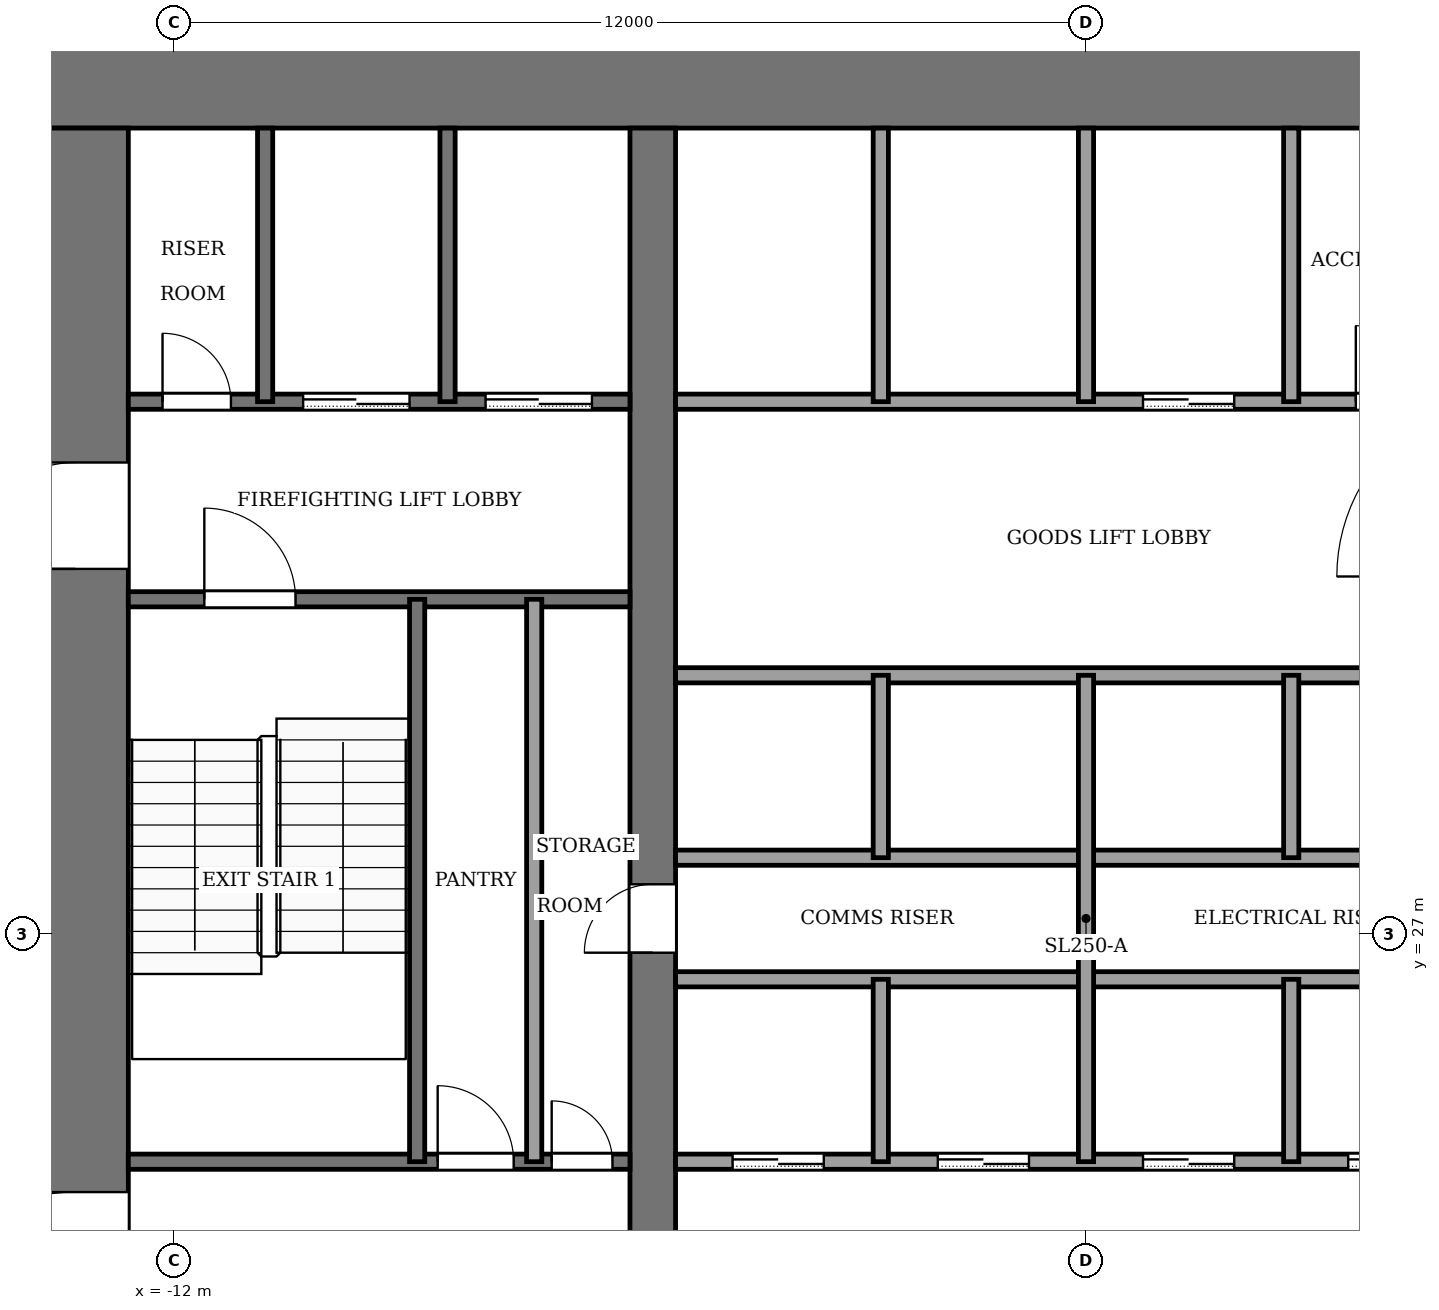
"""IFC4 building model, lengths in metres.
Left out: names, types, materials, properties, quantities, classifications, styles, units other than length and angle.
Written with IfcOpenShell. Run it as: python <this file> out.ifc"""

import sys

from ifc_helpers import new_model, si_unit, direction, frame, frame_2d, origin, place, context, subcontext, project, spatial, rectangle, extrude, element, fill, save


model = new_model("IFC4")
c1 = context("Model", 3, precision=1e-05, world=origin(), true_north=direction((0.0, 1.0)))
c2 = subcontext(c1, "Body", "Model", "MODEL_VIEW")
j1 = project(units=[si_unit("LENGTHUNIT", "METRE"), si_unit("PLANEANGLEUNIT", "RADIAN")], contexts=[c1])
p1 = place(None, origin())
s1 = spatial("IfcSite", under=j1, at=p1, CompositionType="ELEMENT")
p2 = place(p1, origin())
s2 = spatial("IfcBuilding", under=s1, at=p2, CompositionType="ELEMENT")
p3 = place(p2, frame((0.0, 0.0, 38.0)))
s3 = spatial("IfcBuildingStorey", under=s2, at=p3, CompositionType="ELEMENT", Elevation=38.0)
p4 = place(p3, frame((-14.0, 38.3, -0.13), z_axis=(0.0, 0.0, 1.0), x_axis=(1.0, 0.0, 0.0)))
e1 = element("IfcWall", 1, at=p4, inside=s3, PredefinedType="SHEAR", context=c2, shape_type="SweptSolid", body=[
    extrude(rectangle(XDim=28.0, YDim=1.4, at=frame_2d((14.0, 0.0))), origin(), (0.0, 0.0, 1.0), 4.0),
])
p5 = place(p3, frame((-13.3, 18.4, -0.13), z_axis=(0.0, 0.0, 1.0), x_axis=(0.0, 1.0, 0.0)))
e2 = element("IfcWall", 2, at=p5, inside=s3, PredefinedType="SHEAR", context=c2, shape_type="SweptSolid", body=[
    extrude(rectangle(XDim=19.2, YDim=1.4, at=frame_2d((9.6, 0.0))), origin(), (0.0, 0.0, 1.0), 4.0),
])
p6 = place(p5, frame((2.8, 0.0, 0.13)))
e3 = element("IfcOpeningElement", 3, at=p6, cuts=e2, PredefinedType="OPENING", context=c2, shape_type="SweptSolid", body=[
    extrude(rectangle(XDim=2.4, YDim=2.4, at=frame_2d((1.2, 1.2))), frame((0.0, 0.71, 0.0), z_axis=(0.0, -1.0, 0.0), x_axis=(1.0, 0.0, 0.0)), (0.0, 0.0, 1.0), 1.42),
])
p7 = place(p5, frame((13.4, 0.0, 0.13)))
e4 = element("IfcOpeningElement", 4, at=p7, cuts=e2, PredefinedType="OPENING", context=c2, shape_type="SweptSolid", body=[
    extrude(rectangle(XDim=1.4, YDim=2.2, at=frame_2d((0.7, 1.1))), frame((0.0, 0.71, 0.0), z_axis=(0.0, -1.0, 0.0), x_axis=(1.0, 0.0, 0.0)), (0.0, 0.0, 1.0), 1.42),
])
p8 = place(p3, frame((-5.7, 18.4, -0.13), z_axis=(0.0, 0.0, 1.0), x_axis=(0.0, 1.0, 0.0)))
e5 = element("IfcWall", 5, at=p8, inside=s3, PredefinedType="SHEAR", context=c2, shape_type="SweptSolid", body=[
    extrude(rectangle(XDim=19.2, YDim=0.6, at=frame_2d((9.6, 0.0))), origin(), (0.0, 0.0, 1.0), 4.0),
])
p9 = place(p8, frame((8.35, 0.0, 0.13)))
e6 = element("IfcOpeningElement", 6, at=p9, cuts=e5, PredefinedType="OPENING", context=c2, shape_type="SweptSolid", body=[
    extrude(rectangle(XDim=0.9, YDim=2.1, at=frame_2d((0.45, 1.05))), frame((0.0, 0.31, 0.0), z_axis=(0.0, -1.0, 0.0), x_axis=(1.0, 0.0, 0.0)), (0.0, 0.0, 1.0), 0.62),
])
p10 = place(p3, frame((-12.6, 24.0, 0.0), z_axis=(0.0, 0.0, 1.0), x_axis=(1.0, 0.0, 0.0)))
e7 = element("IfcWall", 7, at=p10, inside=s3, PredefinedType="PARTITIONING", context=c2, shape_type="SweptSolid", body=[
    extrude(rectangle(XDim=6.6, YDim=0.2, at=frame_2d((3.3, 0.0))), origin(), (0.0, 0.0, 1.0), 3.87),
])
p11 = place(p10, frame((4.07, 0.0, 0.0)))
e8 = element("IfcOpeningElement", 8, at=p11, cuts=e7, PredefinedType="OPENING", context=c2, shape_type="SweptSolid", body=[
    extrude(rectangle(XDim=1.0, YDim=2.1, at=frame_2d((0.5, 1.05))), frame((0.0, 0.11, 0.0), z_axis=(0.0, -1.0, 0.0), x_axis=(1.0, 0.0, 0.0)), (0.0, 0.0, 1.0), 0.22),
])
p12 = place(p10, frame((5.57, 0.0, 0.0)))
e9 = element("IfcOpeningElement", 9, at=p12, cuts=e7, PredefinedType="OPENING", context=c2, shape_type="SweptSolid", body=[
    extrude(rectangle(XDim=0.8, YDim=2.1, at=frame_2d((0.4, 1.05))), frame((0.0, 0.11, 0.0), z_axis=(0.0, -1.0, 0.0), x_axis=(1.0, 0.0, 0.0)), (0.0, 0.0, 1.0), 0.22),
])
p13 = place(p3, frame((-5.4, 24.0, 0.0), z_axis=(0.0, 0.0, 1.0), x_axis=(1.0, 0.0, 0.0)))
e10 = element("IfcWall", 10, at=p13, inside=s3, PredefinedType="PARTITIONING", context=c2, shape_type="SweptSolid", body=[
    extrude(rectangle(XDim=10.8, YDim=0.2, at=frame_2d((5.4, 0.0))), origin(), (0.0, 0.0, 1.0), 3.87),
])
p14 = place(p13, frame((0.75, 0.0, 0.0)))
e11 = element("IfcOpeningElement", 11, at=p14, cuts=e10, PredefinedType="OPENING", context=c2, shape_type="SweptSolid", body=[
    extrude(rectangle(XDim=1.2, YDim=2.2, at=frame_2d((0.6, 1.1))), frame((0.0, 0.11, 0.0), z_axis=(0.0, -1.0, 0.0), x_axis=(1.0, 0.0, 0.0)), (0.0, 0.0, 1.0), 0.22),
])
p15 = place(p13, frame((3.45, 0.0, 0.0)))
e12 = element("IfcOpeningElement", 12, at=p15, cuts=e10, PredefinedType="OPENING", context=c2, shape_type="SweptSolid", body=[
    extrude(rectangle(XDim=1.2, YDim=2.2, at=frame_2d((0.6, 1.1))), frame((0.0, 0.11, 0.0), z_axis=(0.0, -1.0, 0.0), x_axis=(1.0, 0.0, 0.0)), (0.0, 0.0, 1.0), 0.22),
])
p16 = place(p13, frame((6.15, 0.0, 0.0)))
e13 = element("IfcOpeningElement", 13, at=p16, cuts=e10, PredefinedType="OPENING", context=c2, shape_type="SweptSolid", body=[
    extrude(rectangle(XDim=1.2, YDim=2.2, at=frame_2d((0.6, 1.1))), frame((0.0, 0.11, 0.0), z_axis=(0.0, -1.0, 0.0), x_axis=(1.0, 0.0, 0.0)), (0.0, 0.0, 1.0), 0.22),
])
p17 = place(p13, frame((8.85, 0.0, 0.0)))
e14 = element("IfcOpeningElement", 14, at=p17, cuts=e10, PredefinedType="OPENING", context=c2, shape_type="SweptSolid", body=[
    extrude(rectangle(XDim=1.2, YDim=2.2, at=frame_2d((0.6, 1.1))), frame((0.0, 0.11, 0.0), z_axis=(0.0, -1.0, 0.0), x_axis=(1.0, 0.0, 0.0)), (0.0, 0.0, 1.0), 0.22),
])
for number, where, z_axis, x_axis in (
    (15, (-5.4, 26.4, 0.0), (0.0, 0.0, 1.0), (1.0, 0.0, 0.0)),
    (16, (-5.4, 28.0, 0.0), (0.0, 0.0, 1.0), (1.0, 0.0, 0.0)),
    (17, (-5.4, 30.4, 0.0), (0.0, 0.0, 1.0), (1.0, 0.0, 0.0)),
):
    element("IfcWall", number, at=place(p3, frame(where, z_axis=z_axis, x_axis=x_axis)), inside=s3, PredefinedType="PARTITIONING", context=c2, shape_type="SweptSolid", body=[
        extrude(rectangle(XDim=10.8, YDim=0.2, at=frame_2d((5.4, 0.0))), origin(), (0.0, 0.0, 1.0), 3.87),
    ])
p18 = place(p3, frame((-12.6, 31.4, 0.0), z_axis=(0.0, 0.0, 1.0), x_axis=(1.0, 0.0, 0.0)))
e18 = element("IfcWall", 18, at=p18, inside=s3, PredefinedType="PARTITIONING", context=c2, shape_type="SweptSolid", body=[
    extrude(rectangle(XDim=6.6, YDim=0.2, at=frame_2d((3.3, 0.0))), origin(), (0.0, 0.0, 1.0), 3.87),
])
p19 = place(p18, frame((1.0, 0.0, 0.0)))
e19 = element("IfcOpeningElement", 19, at=p19, cuts=e18, PredefinedType="OPENING", context=c2, shape_type="SweptSolid", body=[
    extrude(rectangle(XDim=1.2, YDim=2.2, at=frame_2d((0.6, 1.1))), frame((0.0, 0.11, 0.0), z_axis=(0.0, -1.0, 0.0), x_axis=(1.0, 0.0, 0.0)), (0.0, 0.0, 1.0), 0.22),
])
p20 = place(p3, frame((-12.6, 34.0, 0.0), z_axis=(0.0, 0.0, 1.0), x_axis=(1.0, 0.0, 0.0)))
e20 = element("IfcWall", 20, at=p20, inside=s3, PredefinedType="PARTITIONING", context=c2, shape_type="SweptSolid", body=[
    extrude(rectangle(XDim=6.6, YDim=0.2, at=frame_2d((3.3, 0.0))), origin(), (0.0, 0.0, 1.0), 3.87),
])
p21 = place(p20, frame((4.7, 0.0, 0.0)))
e21 = element("IfcOpeningElement", 21, at=p21, cuts=e20, PredefinedType="OPENING", context=c2, shape_type="SweptSolid", body=[
    extrude(rectangle(XDim=1.4, YDim=2.2, at=frame_2d((0.7, 1.1))), frame((0.0, 0.11, 0.0), z_axis=(0.0, -1.0, 0.0), x_axis=(1.0, 0.0, 0.0)), (0.0, 0.0, 1.0), 0.22),
])
p22 = place(p20, frame((2.3, 0.0, 0.0)))
e22 = element("IfcOpeningElement", 22, at=p22, cuts=e20, PredefinedType="OPENING", context=c2, shape_type="SweptSolid", body=[
    extrude(rectangle(XDim=1.4, YDim=2.2, at=frame_2d((0.7, 1.1))), frame((0.0, 0.11, 0.0), z_axis=(0.0, -1.0, 0.0), x_axis=(1.0, 0.0, 0.0)), (0.0, 0.0, 1.0), 0.22),
])
p23 = place(p20, frame((0.45, 0.0, 0.0)))
e23 = element("IfcOpeningElement", 23, at=p23, cuts=e20, PredefinedType="OPENING", context=c2, shape_type="SweptSolid", body=[
    extrude(rectangle(XDim=0.9, YDim=2.1, at=frame_2d((0.45, 1.05))), frame((0.0, 0.11, 0.0), z_axis=(0.0, -1.0, 0.0), x_axis=(1.0, 0.0, 0.0)), (0.0, 0.0, 1.0), 0.22),
])
p24 = place(p3, frame((-5.4, 34.0, 0.0), z_axis=(0.0, 0.0, 1.0), x_axis=(1.0, 0.0, 0.0)))
e24 = element("IfcWall", 24, at=p24, inside=s3, PredefinedType="PARTITIONING", context=c2, shape_type="SweptSolid", body=[
    extrude(rectangle(XDim=10.8, YDim=0.2, at=frame_2d((5.4, 0.0))), origin(), (0.0, 0.0, 1.0), 3.87),
])
p25 = place(p24, frame((6.15, 0.0, 0.0)))
e25 = element("IfcOpeningElement", 25, at=p25, cuts=e24, PredefinedType="OPENING", context=c2, shape_type="SweptSolid", body=[
    extrude(rectangle(XDim=1.2, YDim=2.2, at=frame_2d((0.6, 1.1))), frame((0.0, 0.11, 0.0), z_axis=(0.0, -1.0, 0.0), x_axis=(1.0, 0.0, 0.0)), (0.0, 0.0, 1.0), 0.22),
])
p26 = place(p24, frame((8.95, 0.0, 0.0)))
e26 = element("IfcOpeningElement", 26, at=p26, cuts=e24, PredefinedType="OPENING", context=c2, shape_type="SweptSolid", body=[
    extrude(rectangle(XDim=1.0, YDim=2.1, at=frame_2d((0.5, 1.05))), frame((0.0, 0.11, 0.0), z_axis=(0.0, -1.0, 0.0), x_axis=(1.0, 0.0, 0.0)), (0.0, 0.0, 1.0), 0.22),
])
p27 = place(p3, frame((-10.8, 34.0, 0.0), z_axis=(0.0, 0.0, 1.0), x_axis=(0.0, 1.0, 0.0)))
e27 = element("IfcWall", 27, at=p27, inside=s3, PredefinedType="PARTITIONING", context=c2, shape_type="SweptSolid", body=[
    extrude(rectangle(XDim=3.6, YDim=0.2, at=frame_2d((1.8, 0.0))), origin(), (0.0, 0.0, 1.0), 3.87),
])
p28 = place(p3, frame((-8.8, 24.0, 0.0), z_axis=(0.0, 0.0, 1.0), x_axis=(0.0, 1.0, 0.0)))
e28 = element("IfcWall", 28, at=p28, inside=s3, PredefinedType="PARTITIONING", context=c2, shape_type="SweptSolid", body=[
    extrude(rectangle(XDim=7.4, YDim=0.2, at=frame_2d((3.7, 0.0))), origin(), (0.0, 0.0, 1.0), 3.87),
])
p29 = place(p3, frame((-8.4, 34.0, 0.0), z_axis=(0.0, 0.0, 1.0), x_axis=(0.0, 1.0, 0.0)))
e29 = element("IfcWall", 29, at=p29, inside=s3, PredefinedType="PARTITIONING", context=c2, shape_type="SweptSolid", body=[
    extrude(rectangle(XDim=3.6, YDim=0.2, at=frame_2d((1.8, 0.0))), origin(), (0.0, 0.0, 1.0), 3.87),
])
p30 = place(p3, frame((-7.26, 24.0, 0.0), z_axis=(0.0, 0.0, 1.0), x_axis=(0.0, 1.0, 0.0)))
e30 = element("IfcWall", 30, at=p30, inside=s3, PredefinedType="PARTITIONING", context=c2, shape_type="SweptSolid", body=[
    extrude(rectangle(XDim=7.4, YDim=0.2, at=frame_2d((3.7, 0.0))), origin(), (0.0, 0.0, 1.0), 3.87),
])
for number, where, z_axis, x_axis in (
    (31, (-2.7, 24.0, 0.0), (0.0, 0.0, 1.0), (0.0, 1.0, 0.0)),
    (32, (-2.7, 28.0, 0.0), (0.0, 0.0, 1.0), (0.0, 1.0, 0.0)),
):
    element("IfcWall", number, at=place(p3, frame(where, z_axis=z_axis, x_axis=x_axis)), inside=s3, PredefinedType="PARTITIONING", context=c2, shape_type="SweptSolid", body=[
        extrude(rectangle(XDim=2.4, YDim=0.2, at=frame_2d((1.2, 0.0))), origin(), (0.0, 0.0, 1.0), 3.87),
    ])
p31 = place(p3, frame((-2.7, 34.0, 0.0), z_axis=(0.0, 0.0, 1.0), x_axis=(0.0, 1.0, 0.0)))
e33 = element("IfcWall", 33, at=p31, inside=s3, PredefinedType="PARTITIONING", context=c2, shape_type="SweptSolid", body=[
    extrude(rectangle(XDim=3.6, YDim=0.2, at=frame_2d((1.8, 0.0))), origin(), (0.0, 0.0, 1.0), 3.87),
])
p32 = place(p3, frame((0.0, 24.0, 0.0), z_axis=(0.0, 0.0, 1.0), x_axis=(0.0, 1.0, 0.0)))
e34 = element("IfcWall", 34, at=p32, inside=s3, PredefinedType="PARTITIONING", context=c2, shape_type="SweptSolid", body=[
    extrude(rectangle(XDim=6.4, YDim=0.2, at=frame_2d((3.2, 0.0))), origin(), (0.0, 0.0, 1.0), 3.87),
])
p33 = place(p3, frame((0.0, 34.0, 0.0), z_axis=(0.0, 0.0, 1.0), x_axis=(0.0, 1.0, 0.0)))
e35 = element("IfcWall", 35, at=p33, inside=s3, PredefinedType="PARTITIONING", context=c2, shape_type="SweptSolid", body=[
    extrude(rectangle(XDim=3.6, YDim=0.2, at=frame_2d((1.8, 0.0))), origin(), (0.0, 0.0, 1.0), 3.87),
])
for number, where, z_axis, x_axis in (
    (36, (2.7, 24.0, 0.0), (0.0, 0.0, 1.0), (0.0, 1.0, 0.0)),
    (37, (2.7, 28.0, 0.0), (0.0, 0.0, 1.0), (0.0, 1.0, 0.0)),
):
    element("IfcWall", number, at=place(p3, frame(where, z_axis=z_axis, x_axis=x_axis)), inside=s3, PredefinedType="PARTITIONING", context=c2, shape_type="SweptSolid", body=[
        extrude(rectangle(XDim=2.4, YDim=0.2, at=frame_2d((1.2, 0.0))), origin(), (0.0, 0.0, 1.0), 3.87),
    ])
p34 = place(p3, frame((2.7, 34.0, 0.0), z_axis=(0.0, 0.0, 1.0), x_axis=(0.0, 1.0, 0.0)))
e38 = element("IfcWall", 38, at=p34, inside=s3, PredefinedType="PARTITIONING", context=c2, shape_type="SweptSolid", body=[
    extrude(rectangle(XDim=3.6, YDim=0.2, at=frame_2d((1.8, 0.0))), origin(), (0.0, 0.0, 1.0), 3.87),
])
p35 = place(p14, origin())
e39 = element("IfcDoor", 39, at=p35, inside=s3, OperationType="SLIDING_TO_LEFT", PredefinedType="DOOR", context=c2, shape_type="SweptSolid", body=[
    extrude(rectangle(XDim=1.2, YDim=2.2, at=frame_2d((0.6, 1.1))), frame((0.0, 0.025, 0.0), z_axis=(0.0, -1.0, 0.0), x_axis=(1.0, 0.0, 0.0)), (0.0, 0.0, 1.0), 0.05),
])
fill(e11, e39)
p36 = place(p15, origin())
e40 = element("IfcDoor", 40, at=p36, inside=s3, OperationType="SLIDING_TO_LEFT", PredefinedType="DOOR", context=c2, shape_type="SweptSolid", body=[
    extrude(rectangle(XDim=1.2, YDim=2.2, at=frame_2d((0.6, 1.1))), frame((0.0, 0.025, 0.0), z_axis=(0.0, -1.0, 0.0), x_axis=(1.0, 0.0, 0.0)), (0.0, 0.0, 1.0), 0.05),
])
fill(e12, e40)
p37 = place(p16, origin())
e41 = element("IfcDoor", 41, at=p37, inside=s3, OperationType="SLIDING_TO_LEFT", PredefinedType="DOOR", context=c2, shape_type="SweptSolid", body=[
    extrude(rectangle(XDim=1.2, YDim=2.2, at=frame_2d((0.6, 1.1))), frame((0.0, 0.025, 0.0), z_axis=(0.0, -1.0, 0.0), x_axis=(1.0, 0.0, 0.0)), (0.0, 0.0, 1.0), 0.05),
])
fill(e13, e41)
p38 = place(p17, origin())
e42 = element("IfcDoor", 42, at=p38, inside=s3, OperationType="SLIDING_TO_LEFT", PredefinedType="DOOR", context=c2, shape_type="SweptSolid", body=[
    extrude(rectangle(XDim=1.2, YDim=2.2, at=frame_2d((0.6, 1.1))), frame((0.0, 0.025, 0.0), z_axis=(0.0, -1.0, 0.0), x_axis=(1.0, 0.0, 0.0)), (0.0, 0.0, 1.0), 0.05),
])
fill(e14, e42)
p39 = place(p25, origin())
e43 = element("IfcDoor", 43, at=p39, inside=s3, OperationType="SLIDING_TO_LEFT", PredefinedType="DOOR", context=c2, shape_type="SweptSolid", body=[
    extrude(rectangle(XDim=1.2, YDim=2.2, at=frame_2d((0.6, 1.1))), frame((0.0, 0.025, 0.0), z_axis=(0.0, -1.0, 0.0), x_axis=(1.0, 0.0, 0.0)), (0.0, 0.0, 1.0), 0.05),
])
fill(e25, e43)
p40 = place(p21, origin())
e44 = element("IfcDoor", 44, at=p40, inside=s3, OperationType="SLIDING_TO_LEFT", PredefinedType="DOOR", context=c2, shape_type="SweptSolid", body=[
    extrude(rectangle(XDim=1.4, YDim=2.2, at=frame_2d((0.7, 1.1))), frame((0.0, 0.025, 0.0), z_axis=(0.0, -1.0, 0.0), x_axis=(1.0, 0.0, 0.0)), (0.0, 0.0, 1.0), 0.05),
])
fill(e21, e44)
p41 = place(p22, origin())
e45 = element("IfcDoor", 45, at=p41, inside=s3, OperationType="SLIDING_TO_LEFT", PredefinedType="DOOR", context=c2, shape_type="SweptSolid", body=[
    extrude(rectangle(XDim=1.4, YDim=2.2, at=frame_2d((0.7, 1.1))), frame((0.0, 0.025, 0.0), z_axis=(0.0, -1.0, 0.0), x_axis=(1.0, 0.0, 0.0)), (0.0, 0.0, 1.0), 0.05),
])
fill(e22, e45)
p42 = place(p23, origin())
e46 = element("IfcDoor", 46, at=p42, inside=s3, OperationType="SINGLE_SWING_RIGHT", PredefinedType="DOOR", context=c2, shape_type="SweptSolid", body=[
    extrude(rectangle(XDim=0.9, YDim=2.1, at=frame_2d((0.45, 1.05))), frame((0.0, 0.025, 0.0), z_axis=(0.0, -1.0, 0.0), x_axis=(1.0, 0.0, 0.0)), (0.0, 0.0, 1.0), 0.05),
])
fill(e23, e46)
p43 = place(p11, origin())
e47 = element("IfcDoor", 47, at=p43, inside=s3, OperationType="SINGLE_SWING_RIGHT", PredefinedType="DOOR", context=c2, shape_type="SweptSolid", body=[
    extrude(rectangle(XDim=1.0, YDim=2.1, at=frame_2d((0.5, 1.05))), frame((0.0, 0.025, 0.0), z_axis=(0.0, -1.0, 0.0), x_axis=(1.0, 0.0, 0.0)), (0.0, 0.0, 1.0), 0.05),
])
fill(e8, e47)
p44 = place(p12, origin())
e48 = element("IfcDoor", 48, at=p44, inside=s3, OperationType="SINGLE_SWING_LEFT", PredefinedType="DOOR", context=c2, shape_type="SweptSolid", body=[
    extrude(rectangle(XDim=0.8, YDim=2.1, at=frame_2d((0.4, 1.05))), frame((0.0, 0.025, 0.0), z_axis=(0.0, -1.0, 0.0), x_axis=(1.0, 0.0, 0.0)), (0.0, 0.0, 1.0), 0.05),
])
fill(e9, e48)
p45 = place(p26, origin())
e49 = element("IfcDoor", 49, at=p45, inside=s3, OperationType="SINGLE_SWING_LEFT", PredefinedType="DOOR", context=c2, shape_type="SweptSolid", body=[
    extrude(rectangle(XDim=1.0, YDim=2.1, at=frame_2d((0.5, 1.05))), frame((0.0, 0.025, 0.0), z_axis=(0.0, -1.0, 0.0), x_axis=(1.0, 0.0, 0.0)), (0.0, 0.0, 1.0), 0.05),
])
fill(e26, e49)
p46 = place(p9, origin())
e50 = element("IfcDoor", 50, at=p46, inside=s3, OperationType="SINGLE_SWING_LEFT", PredefinedType="DOOR", context=c2, shape_type="SweptSolid", body=[
    extrude(rectangle(XDim=0.9, YDim=2.1, at=frame_2d((0.45, 1.05))), frame((0.0, 0.025, 0.0), z_axis=(0.0, -1.0, 0.0), x_axis=(1.0, 0.0, 0.0)), (0.0, 0.0, 1.0), 0.05),
])
fill(e6, e50)
p47 = place(p19, origin())
e51 = element("IfcDoor", 51, at=p47, inside=s3, OperationType="SINGLE_SWING_RIGHT", PredefinedType="DOOR", context=c2, shape_type="SweptSolid", body=[
    extrude(rectangle(XDim=1.2, YDim=2.2, at=frame_2d((0.6, 1.1))), frame((0.0, 0.025, 0.0), z_axis=(0.0, -1.0, 0.0), x_axis=(1.0, 0.0, 0.0)), (0.0, 0.0, 1.0), 0.05),
])
fill(e19, e51)
p48 = place(p6, origin())
e52 = element("IfcDoor", 52, at=p48, inside=s3, OperationType="DOUBLE_DOOR_SINGLE_SWING", PredefinedType="DOOR", context=c2, shape_type="SweptSolid", body=[
    extrude(rectangle(XDim=2.4, YDim=2.4, at=frame_2d((1.2, 1.2))), frame((0.0, 0.025, 0.0), z_axis=(0.0, -1.0, 0.0), x_axis=(1.0, 0.0, 0.0)), (0.0, 0.0, 1.0), 0.05),
])
fill(e3, e52)
p49 = place(p7, origin())
e53 = element("IfcDoor", 53, at=p49, inside=s3, OperationType="SINGLE_SWING_RIGHT", PredefinedType="DOOR", context=c2, shape_type="SweptSolid", body=[
    extrude(rectangle(XDim=1.4, YDim=2.2, at=frame_2d((0.7, 1.1))), frame((0.0, 0.025, 0.0), z_axis=(0.0, -1.0, 0.0), x_axis=(1.0, 0.0, 0.0)), (0.0, 0.0, 1.0), 0.05),
])
fill(e4, e53)
save(model, sys.argv[1])
